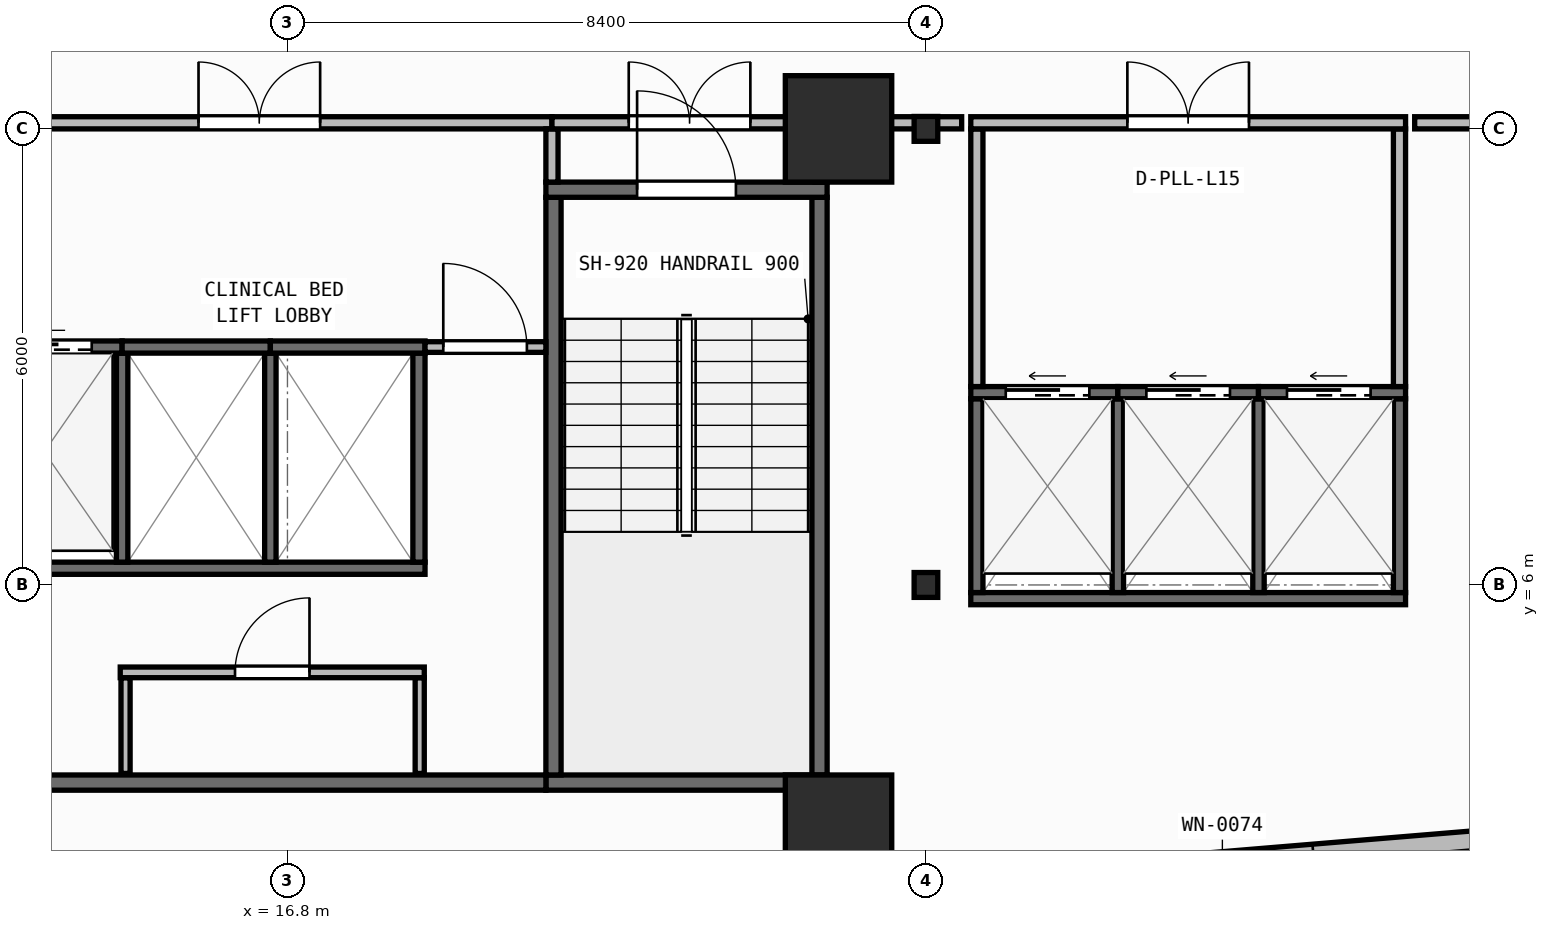
"""IFC4 building model, lengths in metres.
Left out: names, types, materials, properties, quantities, classifications, styles, units other than length and angle.
Written with IfcOpenShell. Run it as: python <this file> out.ifc"""

import sys

from ifc_helpers import new_model, si_unit, direction, frame, frame_2d, origin, origin_2d, place, context, subcontext, project, spatial, rectangle, i_section, extrude, element, fill, save


model = new_model("IFC4")
c1 = context("Model", 3, precision=1e-05, world=origin(), true_north=direction((0.0, 1.0)))
c2 = subcontext(c1, "Body", "Model", "MODEL_VIEW")
j1 = project(units=[si_unit("LENGTHUNIT", "METRE"), si_unit("PLANEANGLEUNIT", "RADIAN")], contexts=[c1])
p1 = place(None, origin())
s1 = spatial("IfcSite", under=j1, at=p1, CompositionType="ELEMENT")
p2 = place(p1, origin())
s2 = spatial("IfcBuilding", under=s1, at=p2, CompositionType="ELEMENT")
p3 = place(p2, frame((0.0, 0.0, 62.0)))
s3 = spatial("IfcBuildingStorey", under=s2, at=p3, CompositionType="ELEMENT", Elevation=62.0)
p4 = place(p3, frame((24.05, 2.8, 0.0), z_axis=(0.0, 0.0, 1.0), x_axis=(1.0, 0.0, 0.0)))
e1 = element("IfcColumn", 1, at=p4, inside=s3, PredefinedType="COLUMN", context=c2, shape_type="SweptSolid", body=[
    extrude(rectangle(XDim=1.4, YDim=1.4, at=origin_2d()), origin(), (0.0, 0.0, 1.0), 3.95),
])
p5 = place(p3, frame((25.2, 6.0, 0.0), z_axis=(0.0, 0.0, 1.0), x_axis=(1.0, 0.0, 0.0)))
e2 = element("IfcColumn", 2, at=p5, inside=s3, PredefinedType="COLUMN", context=c2, shape_type="SweptSolid", body=[
    extrude(i_section(OverallWidth=0.311, OverallDepth=0.327, WebThickness=0.016, FlangeThickness=0.025, FilletRadius=0.017, at=origin_2d()), origin(), (0.0, 0.0, 1.0), 3.95),
])
p6 = place(p3, frame((24.05, 12.0, 0.0), z_axis=(0.0, 0.0, 1.0), x_axis=(1.0, 0.0, 0.0)))
e3 = element("IfcColumn", 3, at=p6, inside=s3, PredefinedType="COLUMN", context=c2, shape_type="SweptSolid", body=[
    extrude(rectangle(XDim=1.4, YDim=1.4, at=origin_2d()), origin(), (0.0, 0.0, 1.0), 3.95),
])
p7 = place(p3, frame((25.2, 12.0, 0.0), z_axis=(0.0, 0.0, 1.0), x_axis=(1.0, 0.0, 0.0)))
e4 = element("IfcColumn", 4, at=p7, inside=s3, PredefinedType="COLUMN", context=c2, shape_type="SweptSolid", body=[
    extrude(i_section(OverallWidth=0.311, OverallDepth=0.327, WebThickness=0.016, FlangeThickness=0.025, FilletRadius=0.017, at=origin_2d()), origin(), (0.0, 0.0, 1.0), 3.95),
])
p8 = place(p3, frame((2.76, 0.174, 0.0), z_axis=(0.0, 0.0, 1.0), x_axis=(0.996571478456, 0.082736257641, 0.0)))
e5 = element("IfcWall", 5, at=p8, inside=s3, PredefinedType="STANDARD", context=c2, shape_type="SweptSolid", body=[
    extrude(rectangle(XDim=52.861, YDim=0.26, at=frame_2d((26.431, 0.0))), origin(), (0.0, 0.0, 1.0), 3.71),
])
p9 = place(p8, frame((25.231, 0.0, 0.9)))
e6 = element("IfcOpeningElement", 6, at=p9, cuts=e5, PredefinedType="OPENING", context=c2, shape_type="SweptSolid", body=[
    extrude(rectangle(XDim=2.4, YDim=1.65, at=frame_2d((1.2, 0.825))), frame((0.0, 0.14, 0.0), z_axis=(0.0, -1.0, 0.0), x_axis=(1.0, 0.0, 0.0)), (0.0, 0.0, 1.0), 0.28),
])
p10 = place(p3, frame((20.2, 3.4, 0.0), z_axis=(0.0, 0.0, 1.0), x_axis=(1.0, 0.0, 0.0)))
e7 = element("IfcWall", 7, at=p10, inside=s3, PredefinedType="SHEAR", context=c2, shape_type="SweptSolid", body=[
    extrude(rectangle(XDim=3.7, YDim=0.2, at=frame_2d((1.85, 0.0))), origin(), (0.0, 0.0, 1.0), 3.71),
])
for number, where, z_axis, x_axis in (
    (8, (20.3, 3.5, 0.0), (0.0, 0.0, 1.0), (0.0, 1.0, 0.0)),
    (9, (23.8, 3.5, 0.0), (0.0, 0.0, 1.0), (0.0, 1.0, 0.0)),
):
    element("IfcWall", number, at=place(p3, frame(where, z_axis=z_axis, x_axis=x_axis)), inside=s3, PredefinedType="SHEAR", context=c2, shape_type="SweptSolid", body=[
        extrude(rectangle(XDim=7.6, YDim=0.2, at=frame_2d((3.8, 0.0))), origin(), (0.0, 0.0, 1.0), 3.71),
    ])
p11 = place(p3, frame((20.2, 11.2, 0.0), z_axis=(0.0, 0.0, 1.0), x_axis=(1.0, 0.0, 0.0)))
e10 = element("IfcWall", 10, at=p11, inside=s3, PredefinedType="SHEAR", context=c2, shape_type="SweptSolid", body=[
    extrude(rectangle(XDim=3.7, YDim=0.2, at=frame_2d((1.85, 0.0))), origin(), (0.0, 0.0, 1.0), 3.71),
])
p12 = place(p11, frame((1.2, 0.0, 0.0)))
e11 = element("IfcOpeningElement", 11, at=p12, cuts=e10, PredefinedType="OPENING", context=c2, shape_type="SweptSolid", body=[
    extrude(rectangle(XDim=1.3, YDim=2.15, at=frame_2d((0.65, 1.075))), frame((0.0, 0.11, 0.0), z_axis=(0.0, -1.0, 0.0), x_axis=(1.0, 0.0, 0.0)), (0.0, 0.0, 1.0), 0.22),
])
p13 = place(p3, frame((6.5, 3.4, 0.0), z_axis=(0.0, 0.0, 1.0), x_axis=(1.0, 0.0, 0.0)))
e12 = element("IfcWall", 12, at=p13, inside=s3, PredefinedType="SHEAR", context=c2, shape_type="SweptSolid", body=[
    extrude(rectangle(XDim=13.7, YDim=0.2, at=frame_2d((6.85, 0.0))), origin(), (0.0, 0.0, 1.0), 3.71),
])
p14 = place(p3, frame((6.5, 6.22, 0.0), z_axis=(0.0, 0.0, 1.0), x_axis=(1.0, 0.0, 0.0)))
e13 = element("IfcWall", 13, at=p14, inside=s3, PredefinedType="SHEAR", context=c2, shape_type="SweptSolid", body=[
    extrude(rectangle(XDim=12.11, YDim=0.16, at=frame_2d((6.055, 0.0))), origin(), (0.0, 0.0, 1.0), 3.71),
])
p15 = place(p3, frame((18.53, 6.3, 0.0), z_axis=(0.0, 0.0, 1.0), x_axis=(0.0, 1.0, 0.0)))
e14 = element("IfcWall", 14, at=p15, inside=s3, PredefinedType="SHEAR", context=c2, shape_type="SweptSolid", body=[
    extrude(rectangle(XDim=2.75, YDim=0.16, at=frame_2d((1.375, 0.0))), origin(), (0.0, 0.0, 1.0), 3.71),
])
for number, where, z_axis, x_axis in (
    (15, (14.625, 6.3, 0.0), (0.0, 0.0, 1.0), (0.0, 1.0, 0.0)),
    (16, (16.575, 6.3, 0.0), (0.0, 0.0, 1.0), (0.0, 1.0, 0.0)),
):
    element("IfcWall", number, at=place(p3, frame(where, z_axis=z_axis, x_axis=x_axis)), inside=s3, PredefinedType="SHEAR", context=c2, shape_type="SweptSolid", body=[
        extrude(rectangle(XDim=2.75, YDim=0.15, at=frame_2d((1.375, 0.0))), origin(), (0.0, 0.0, 1.0), 3.71),
    ])
p16 = place(p3, frame((12.575, 9.13, 0.0), z_axis=(0.0, 0.0, 1.0), x_axis=(1.0, 0.0, 0.0)))
e17 = element("IfcWall", 17, at=p16, inside=s3, PredefinedType="SHEAR", context=c2, shape_type="SweptSolid", body=[
    extrude(rectangle(XDim=2.05, YDim=0.16, at=frame_2d((1.025, 0.0))), origin(), (0.0, 0.0, 1.0), 3.71),
])
p17 = place(p16, frame((0.4, 0.0, 0.0)))
e18 = element("IfcOpeningElement", 18, at=p17, cuts=e17, PredefinedType="OPENING", context=c2, shape_type="SweptSolid", body=[
    extrude(rectangle(XDim=1.25, YDim=2.15, at=frame_2d((0.625, 1.075))), frame((0.0, 0.09, 0.0), z_axis=(0.0, -1.0, 0.0), x_axis=(1.0, 0.0, 0.0)), (0.0, 0.0, 1.0), 0.18),
])
p18 = place(p3, frame((14.625, 9.13, 0.0), z_axis=(0.0, 0.0, 1.0), x_axis=(1.0, 0.0, 0.0)))
e19 = element("IfcWall", 19, at=p18, inside=s3, PredefinedType="SHEAR", context=c2, shape_type="SweptSolid", body=[
    extrude(rectangle(XDim=1.95, YDim=0.16, at=frame_2d((0.975, 0.0))), origin(), (0.0, 0.0, 1.0), 3.71),
])
p19 = place(p3, frame((16.575, 9.13, 0.0), z_axis=(0.0, 0.0, 1.0), x_axis=(1.0, 0.0, 0.0)))
e20 = element("IfcWall", 20, at=p19, inside=s3, PredefinedType="SHEAR", context=c2, shape_type="SweptSolid", body=[
    extrude(rectangle(XDim=2.035, YDim=0.16, at=frame_2d((1.018, 0.0))), origin(), (0.0, 0.0, 1.0), 3.71),
])
p20 = place(p3, frame((25.79, 5.82, 0.0), z_axis=(0.0, 0.0, 1.0), x_axis=(1.0, 0.0, 0.0)))
e21 = element("IfcWall", 21, at=p20, inside=s3, PredefinedType="SHEAR", context=c2, shape_type="SweptSolid", body=[
    extrude(rectangle(XDim=5.72, YDim=0.16, at=frame_2d((2.86, 0.0))), origin(), (0.0, 0.0, 1.0), 3.71),
])
for number, where, z_axis, x_axis in (
    (22, (25.87, 5.9, 0.0), (0.0, 0.0, 1.0), (0.0, 1.0, 0.0)),
    (23, (31.43, 5.9, 0.0), (0.0, 0.0, 1.0), (0.0, 1.0, 0.0)),
):
    element("IfcWall", number, at=place(p3, frame(where, z_axis=z_axis, x_axis=x_axis)), inside=s3, PredefinedType="SHEAR", context=c2, shape_type="SweptSolid", body=[
        extrude(rectangle(XDim=2.55, YDim=0.16, at=frame_2d((1.275, 0.0))), origin(), (0.0, 0.0, 1.0), 3.71),
    ])
for number, where, z_axis, x_axis in (
    (24, (27.725, 5.9, 0.0), (0.0, 0.0, 1.0), (0.0, 1.0, 0.0)),
    (25, (29.575, 5.9, 0.0), (0.0, 0.0, 1.0), (0.0, 1.0, 0.0)),
):
    element("IfcWall", number, at=place(p3, frame(where, z_axis=z_axis, x_axis=x_axis)), inside=s3, PredefinedType="SHEAR", context=c2, shape_type="SweptSolid", body=[
        extrude(rectangle(XDim=2.55, YDim=0.15, at=frame_2d((1.275, 0.0))), origin(), (0.0, 0.0, 1.0), 3.71),
    ])
p21 = place(p3, frame((25.79, 8.53, 0.0), z_axis=(0.0, 0.0, 1.0), x_axis=(1.0, 0.0, 0.0)))
e26 = element("IfcWall", 26, at=p21, inside=s3, PredefinedType="SHEAR", context=c2, shape_type="SweptSolid", body=[
    extrude(rectangle(XDim=1.935, YDim=0.16, at=frame_2d((0.968, 0.0))), origin(), (0.0, 0.0, 1.0), 3.71),
])
p22 = place(p21, frame((0.46, 0.0, 0.0)))
e27 = element("IfcOpeningElement", 27, at=p22, cuts=e26, PredefinedType="OPENING", context=c2, shape_type="SweptSolid", body=[
    extrude(rectangle(XDim=1.1, YDim=2.15, at=frame_2d((0.55, 1.075))), frame((0.0, 0.09, 0.0), z_axis=(0.0, -1.0, 0.0), x_axis=(1.0, 0.0, 0.0)), (0.0, 0.0, 1.0), 0.18),
])
p23 = place(p3, frame((27.725, 8.53, 0.0), z_axis=(0.0, 0.0, 1.0), x_axis=(1.0, 0.0, 0.0)))
e28 = element("IfcWall", 28, at=p23, inside=s3, PredefinedType="SHEAR", context=c2, shape_type="SweptSolid", body=[
    extrude(rectangle(XDim=1.85, YDim=0.16, at=frame_2d((0.925, 0.0))), origin(), (0.0, 0.0, 1.0), 3.71),
])
p24 = place(p23, frame((0.375, 0.0, 0.0)))
e29 = element("IfcOpeningElement", 29, at=p24, cuts=e28, PredefinedType="OPENING", context=c2, shape_type="SweptSolid", body=[
    extrude(rectangle(XDim=1.1, YDim=2.15, at=frame_2d((0.55, 1.075))), frame((0.0, 0.09, 0.0), z_axis=(0.0, -1.0, 0.0), x_axis=(1.0, 0.0, 0.0)), (0.0, 0.0, 1.0), 0.18),
])
p25 = place(p3, frame((29.575, 8.53, 0.0), z_axis=(0.0, 0.0, 1.0), x_axis=(1.0, 0.0, 0.0)))
e30 = element("IfcWall", 30, at=p25, inside=s3, PredefinedType="SHEAR", context=c2, shape_type="SweptSolid", body=[
    extrude(rectangle(XDim=1.935, YDim=0.16, at=frame_2d((0.968, 0.0))), origin(), (0.0, 0.0, 1.0), 3.71),
])
p26 = place(p25, frame((0.375, 0.0, 0.0)))
e31 = element("IfcOpeningElement", 31, at=p26, cuts=e30, PredefinedType="OPENING", context=c2, shape_type="SweptSolid", body=[
    extrude(rectangle(XDim=1.1, YDim=2.15, at=frame_2d((0.55, 1.075))), frame((0.0, 0.09, 0.0), z_axis=(0.0, -1.0, 0.0), x_axis=(1.0, 0.0, 0.0)), (0.0, 0.0, 1.0), 0.18),
])
for number, where, z_axis, x_axis in (
    (32, (14.67, 3.52, 0.0), (0.0, 0.0, 1.0), (0.0, 1.0, 0.0)),
    (33, (18.54, 3.52, 0.0), (0.0, 0.0, 1.0), (0.0, 1.0, 0.0)),
):
    element("IfcWall", number, at=place(p3, frame(where, z_axis=z_axis, x_axis=x_axis)), inside=s3, PredefinedType="PARTITIONING", context=c2, shape_type="SweptSolid", body=[
        extrude(rectangle(XDim=1.26, YDim=0.12, at=frame_2d((0.63, 0.0))), origin(), (0.0, 0.0, 1.0), 3.71),
    ])
p27 = place(p3, frame((14.6, 4.85, 0.0), z_axis=(0.0, 0.0, 1.0), x_axis=(1.0, 0.0, 0.0)))
e34 = element("IfcWall", 34, at=p27, inside=s3, PredefinedType="PARTITIONING", context=c2, shape_type="SweptSolid", body=[
    extrude(rectangle(XDim=4.0, YDim=0.14, at=frame_2d((2.0, 0.0))), origin(), (0.0, 0.0, 1.0), 3.71),
])
p28 = place(p27, frame((1.51, 0.0, 0.0)))
e35 = element("IfcOpeningElement", 35, at=p28, cuts=e34, PredefinedType="OPENING", context=c2, shape_type="SweptSolid", body=[
    extrude(rectangle(XDim=0.98, YDim=2.1, at=frame_2d((0.49, 1.05))), frame((0.0, 0.08, 0.0), z_axis=(0.0, -1.0, 0.0), x_axis=(1.0, 0.0, 0.0)), (0.0, 0.0, 1.0), 0.16),
])
p29 = place(p3, frame((18.61, 9.13, 0.0), z_axis=(0.0, 0.0, 1.0), x_axis=(1.0, 0.0, 0.0)))
e36 = element("IfcWall", 36, at=p29, inside=s3, PredefinedType="PARTITIONING", context=c2, shape_type="SweptSolid", body=[
    extrude(rectangle(XDim=1.59, YDim=0.14, at=frame_2d((0.795, 0.0))), origin(), (0.0, 0.0, 1.0), 3.71),
])
p30 = place(p29, frame((0.24, 0.0, 0.0)))
e37 = element("IfcOpeningElement", 37, at=p30, cuts=e36, PredefinedType="OPENING", context=c2, shape_type="SweptSolid", body=[
    extrude(rectangle(XDim=1.1, YDim=2.1, at=frame_2d((0.55, 1.05))), frame((0.0, 0.08, 0.0), z_axis=(0.0, -1.0, 0.0), x_axis=(1.0, 0.0, 0.0)), (0.0, 0.0, 1.0), 0.16),
])
p31 = place(p3, frame((12.58, 12.08, 0.0), z_axis=(0.0, 0.0, 1.0), x_axis=(1.0, 0.0, 0.0)))
e38 = element("IfcWall", 38, at=p31, inside=s3, PredefinedType="PARTITIONING", context=c2, shape_type="SweptSolid", body=[
    extrude(rectangle(XDim=7.7, YDim=0.16, at=frame_2d((3.85, 0.0))), origin(), (0.0, 0.0, 1.0), 3.073),
])
p32 = place(p31, frame((3.05, 0.0, 0.0)))
e39 = element("IfcOpeningElement", 39, at=p32, cuts=e38, PredefinedType="OPENING", context=c2, shape_type="SweptSolid", body=[
    extrude(rectangle(XDim=1.6, YDim=2.05, at=frame_2d((0.8, 1.025))), frame((0.0, 0.09, 0.0), z_axis=(0.0, -1.0, 0.0), x_axis=(1.0, 0.0, 0.0)), (0.0, 0.0, 1.0), 0.18),
])
p33 = place(p3, frame((20.28, 11.3, 0.0), z_axis=(0.0, 0.0, 1.0), x_axis=(0.0, 1.0, 0.0)))
e40 = element("IfcWall", 40, at=p33, inside=s3, PredefinedType="PARTITIONING", context=c2, shape_type="SweptSolid", body=[
    extrude(rectangle(XDim=0.7, YDim=0.16, at=frame_2d((0.35, 0.0))), origin(), (0.0, 0.0, 1.0), 3.71),
])
p34 = place(p3, frame((20.28, 12.08, 0.0), z_axis=(0.0, 0.0, 1.0), x_axis=(1.0, 0.0, 0.0)))
e41 = element("IfcWall", 41, at=p34, inside=s3, PredefinedType="PARTITIONING", context=c2, shape_type="SweptSolid", body=[
    extrude(rectangle(XDim=3.62, YDim=0.16, at=frame_2d((1.81, 0.0))), origin(), (0.0, 0.0, 1.0), 3.073),
])
p35 = place(p34, frame((1.01, 0.0, 0.0)))
e42 = element("IfcOpeningElement", 42, at=p35, cuts=e41, PredefinedType="OPENING", context=c2, shape_type="SweptSolid", body=[
    extrude(rectangle(XDim=1.6, YDim=2.05, at=frame_2d((0.8, 1.025))), frame((0.0, 0.09, 0.0), z_axis=(0.0, -1.0, 0.0), x_axis=(1.0, 0.0, 0.0)), (0.0, 0.0, 1.0), 0.18),
])
p36 = place(p3, frame((23.82, 11.3, 0.0), z_axis=(0.0, 0.0, 1.0), x_axis=(0.0, 1.0, 0.0)))
e43 = element("IfcWall", 43, at=p36, inside=s3, PredefinedType="PARTITIONING", context=c2, shape_type="SweptSolid", body=[
    extrude(rectangle(XDim=0.7, YDim=0.16, at=frame_2d((0.35, 0.0))), origin(), (0.0, 0.0, 1.0), 3.71),
])
for number, where, z_axis, x_axis in (
    (44, (25.87, 8.61, 0.0), (0.0, 0.0, 1.0), (0.0, 1.0, 0.0)),
    (45, (31.43, 8.61, 0.0), (0.0, 0.0, 1.0), (0.0, 1.0, 0.0)),
):
    element("IfcWall", number, at=place(p3, frame(where, z_axis=z_axis, x_axis=x_axis)), inside=s3, PredefinedType="PARTITIONING", context=c2, shape_type="SweptSolid", body=[
        extrude(rectangle(XDim=3.39, YDim=0.16, at=frame_2d((1.695, 0.0))), origin(), (0.0, 0.0, 1.0), 3.71),
    ])
p37 = place(p3, frame((25.79, 12.08, 0.0), z_axis=(0.0, 0.0, 1.0), x_axis=(1.0, 0.0, 0.0)))
e46 = element("IfcWall", 46, at=p37, inside=s3, PredefinedType="PARTITIONING", context=c2, shape_type="SweptSolid", body=[
    extrude(rectangle(XDim=5.72, YDim=0.16, at=frame_2d((2.86, 0.0))), origin(), (0.0, 0.0, 1.0), 3.073),
])
p38 = place(p37, frame((2.06, 0.0, 0.0)))
e47 = element("IfcOpeningElement", 47, at=p38, cuts=e46, PredefinedType="OPENING", context=c2, shape_type="SweptSolid", body=[
    extrude(rectangle(XDim=1.6, YDim=2.05, at=frame_2d((0.8, 1.025))), frame((0.0, 0.09, 0.0), z_axis=(0.0, -1.0, 0.0), x_axis=(1.0, 0.0, 0.0)), (0.0, 0.0, 1.0), 0.18),
])
p39 = place(p3, frame((24.02, 12.08, 0.0), z_axis=(0.0, 0.0, 1.0), x_axis=(1.0, 0.0, 0.0)))
e48 = element("IfcWall", 48, at=p39, inside=s3, PredefinedType="PARTITIONING", context=c2, shape_type="SweptSolid", body=[
    extrude(rectangle(XDim=1.65, YDim=0.16, at=frame_2d((0.825, 0.0))), origin(), (0.0, 0.0, 1.0), 3.073),
])
p40 = place(p3, frame((31.63, 12.08, 0.0), z_axis=(0.0, 0.0, 1.0), x_axis=(1.0, 0.0, 0.0)))
e49 = element("IfcWall", 49, at=p40, inside=s3, PredefinedType="PARTITIONING", context=c2, shape_type="SweptSolid", body=[
    extrude(rectangle(XDim=11.181, YDim=0.16, at=frame_2d((5.59, 0.0))), origin(), (0.0, 0.0, 1.0), 3.073),
])
p41 = place(p12, origin())
e50 = element("IfcDoor", 50, at=p41, inside=s3, OperationType="SINGLE_SWING_LEFT", PredefinedType="DOOR", context=c2, shape_type="SweptSolid", body=[
    extrude(rectangle(XDim=1.3, YDim=2.15, at=frame_2d((0.65, 1.075))), frame((0.0, 0.025, 0.0), z_axis=(0.0, -1.0, 0.0), x_axis=(1.0, 0.0, 0.0)), (0.0, 0.0, 1.0), 0.05),
])
fill(e11, e50)
p42 = place(p17, origin())
e51 = element("IfcDoor", 51, at=p42, inside=s3, OperationType="SLIDING_TO_LEFT", PredefinedType="DOOR", context=c2, shape_type="SweptSolid", body=[
    extrude(rectangle(XDim=1.25, YDim=2.15, at=frame_2d((0.625, 1.075))), frame((0.0, 0.025, 0.0), z_axis=(0.0, -1.0, 0.0), x_axis=(1.0, 0.0, 0.0)), (0.0, 0.0, 1.0), 0.05),
])
fill(e18, e51)
p43 = place(p22, origin())
e52 = element("IfcDoor", 52, at=p43, inside=s3, OperationType="SLIDING_TO_LEFT", PredefinedType="DOOR", context=c2, shape_type="SweptSolid", body=[
    extrude(rectangle(XDim=1.1, YDim=2.15, at=frame_2d((0.55, 1.075))), frame((0.0, 0.025, 0.0), z_axis=(0.0, -1.0, 0.0), x_axis=(1.0, 0.0, 0.0)), (0.0, 0.0, 1.0), 0.05),
])
fill(e27, e52)
p44 = place(p24, origin())
e53 = element("IfcDoor", 53, at=p44, inside=s3, OperationType="SLIDING_TO_LEFT", PredefinedType="DOOR", context=c2, shape_type="SweptSolid", body=[
    extrude(rectangle(XDim=1.1, YDim=2.15, at=frame_2d((0.55, 1.075))), frame((0.0, 0.025, 0.0), z_axis=(0.0, -1.0, 0.0), x_axis=(1.0, 0.0, 0.0)), (0.0, 0.0, 1.0), 0.05),
])
fill(e29, e53)
p45 = place(p26, origin())
e54 = element("IfcDoor", 54, at=p45, inside=s3, OperationType="SLIDING_TO_LEFT", PredefinedType="DOOR", context=c2, shape_type="SweptSolid", body=[
    extrude(rectangle(XDim=1.1, YDim=2.15, at=frame_2d((0.55, 1.075))), frame((0.0, 0.025, 0.0), z_axis=(0.0, -1.0, 0.0), x_axis=(1.0, 0.0, 0.0)), (0.0, 0.0, 1.0), 0.05),
])
fill(e31, e54)
p46 = place(p28, origin())
e55 = element("IfcDoor", 55, at=p46, inside=s3, OperationType="SINGLE_SWING_RIGHT", PredefinedType="DOOR", context=c2, shape_type="SweptSolid", body=[
    extrude(rectangle(XDim=0.98, YDim=2.1, at=frame_2d((0.49, 1.05))), frame((0.0, 0.025, 0.0), z_axis=(0.0, -1.0, 0.0), x_axis=(1.0, 0.0, 0.0)), (0.0, 0.0, 1.0), 0.05),
])
fill(e35, e55)
p47 = place(p30, origin())
e56 = element("IfcDoor", 56, at=p47, inside=s3, OperationType="SINGLE_SWING_LEFT", PredefinedType="DOOR", context=c2, shape_type="SweptSolid", body=[
    extrude(rectangle(XDim=1.1, YDim=2.1, at=frame_2d((0.55, 1.05))), frame((0.0, 0.025, 0.0), z_axis=(0.0, -1.0, 0.0), x_axis=(1.0, 0.0, 0.0)), (0.0, 0.0, 1.0), 0.05),
])
fill(e37, e56)
p48 = place(p32, origin())
e57 = element("IfcDoor", 57, at=p48, inside=s3, OperationType="DOUBLE_DOOR_SINGLE_SWING", PredefinedType="DOOR", context=c2, shape_type="SweptSolid", body=[
    extrude(rectangle(XDim=1.6, YDim=2.05, at=frame_2d((0.8, 1.025))), frame((0.0, 0.025, 0.0), z_axis=(0.0, -1.0, 0.0), x_axis=(1.0, 0.0, 0.0)), (0.0, 0.0, 1.0), 0.05),
])
fill(e39, e57)
p49 = place(p35, origin())
e58 = element("IfcDoor", 58, at=p49, inside=s3, OperationType="DOUBLE_DOOR_SINGLE_SWING", PredefinedType="DOOR", context=c2, shape_type="SweptSolid", body=[
    extrude(rectangle(XDim=1.6, YDim=2.05, at=frame_2d((0.8, 1.025))), frame((0.0, 0.025, 0.0), z_axis=(0.0, -1.0, 0.0), x_axis=(1.0, 0.0, 0.0)), (0.0, 0.0, 1.0), 0.05),
])
fill(e42, e58)
p50 = place(p38, origin())
e59 = element("IfcDoor", 59, at=p50, inside=s3, OperationType="DOUBLE_DOOR_SINGLE_SWING", PredefinedType="DOOR", context=c2, shape_type="SweptSolid", body=[
    extrude(rectangle(XDim=1.6, YDim=2.05, at=frame_2d((0.8, 1.025))), frame((0.0, 0.025, 0.0), z_axis=(0.0, -1.0, 0.0), x_axis=(1.0, 0.0, 0.0)), (0.0, 0.0, 1.0), 0.05),
])
fill(e47, e59)
save(model, sys.argv[1])
